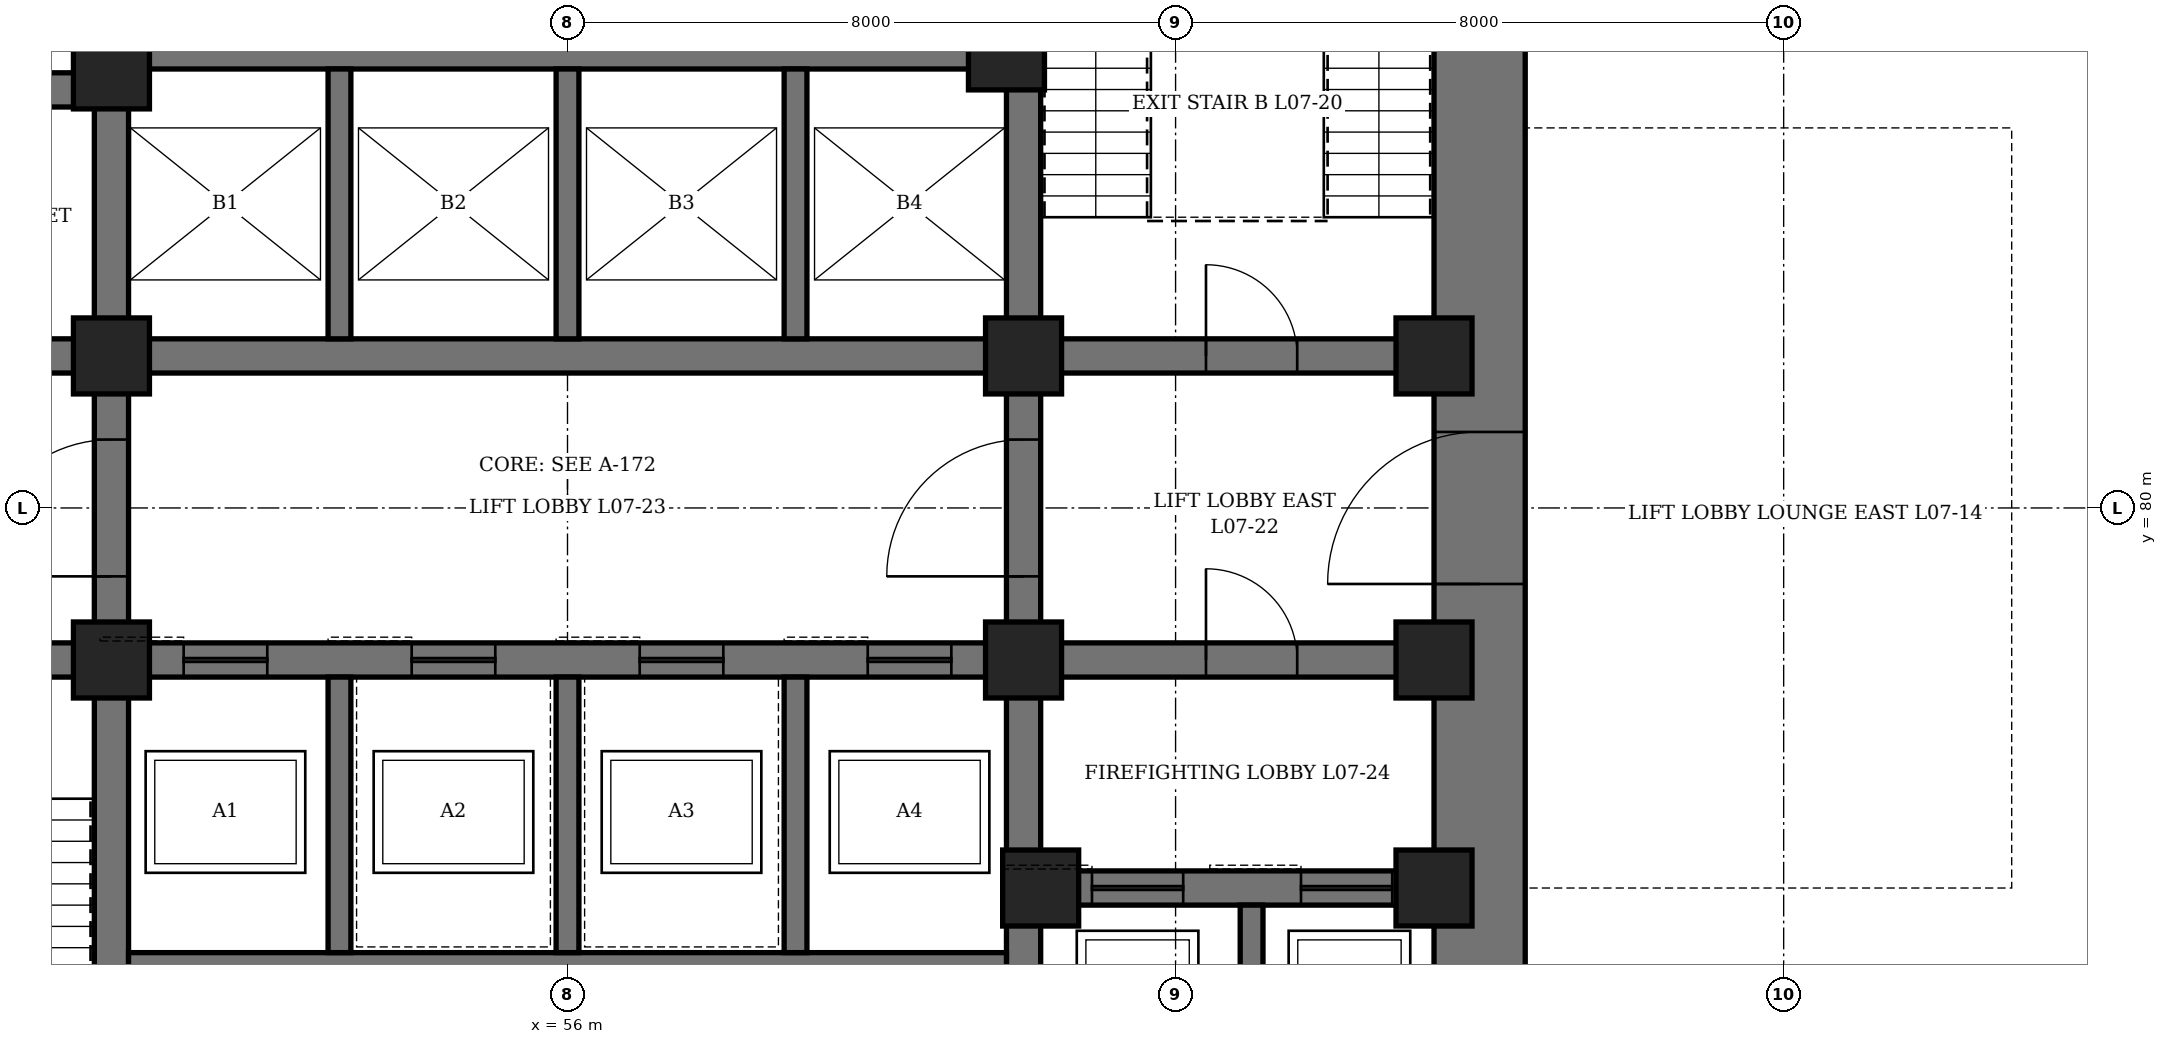
"""IFC4 building model, lengths in metres.
Left out: names, types, materials, properties, quantities, classifications, styles, units other than length and angle.
Written with IfcOpenShell. Run it as: python <this file> out.ifc"""

import sys

from ifc_helpers import new_model, si_unit, direction, frame, frame_2d, origin, origin_2d, place, context, subcontext, project, spatial, rectangle, hollow_rectangle, extrude, element, fill, save


model = new_model("IFC4")
c1 = context("Model", 3, precision=1e-05, world=origin(), true_north=direction((0.0, 1.0)))
c2 = subcontext(c1, "Body", "Model", "MODEL_VIEW")
j1 = project(units=[si_unit("LENGTHUNIT", "METRE"), si_unit("PLANEANGLEUNIT", "RADIAN")], contexts=[c1])
p1 = place(None, origin())
s1 = spatial("IfcSite", under=j1, at=p1, CompositionType="ELEMENT")
p2 = place(p1, origin())
s2 = spatial("IfcBuilding", under=s1, at=p2, CompositionType="ELEMENT")
p3 = place(p2, frame((0.0, 0.0, 39.1)))
s3 = spatial("IfcBuildingStorey", under=s2, at=p3, CompositionType="ELEMENT", Elevation=39.1)
p4 = place(p3, frame((68.0, 70.4, 0.0), z_axis=(0.0, 0.0, 1.0), x_axis=(0.0, 1.0, 0.0)))
e1 = element("IfcWall", 1, at=p4, inside=s3, PredefinedType="SHEAR", context=c2, shape_type="SweptSolid", body=[
    extrude(rectangle(XDim=19.2, YDim=1.2, at=frame_2d((9.6, 0.0))), origin(), (0.0, 0.0, 1.0), 4.2),
])
p5 = place(p4, frame((8.6, 0.0, 0.0)))
e2 = element("IfcOpeningElement", 2, at=p5, cuts=e1, PredefinedType="OPENING", context=c2, shape_type="SweptSolid", body=[
    extrude(rectangle(XDim=2.0, YDim=2.4, at=frame_2d((1.0, 1.2))), frame((0.0, 0.61, 0.0), z_axis=(0.0, -1.0, 0.0), x_axis=(1.0, 0.0, 0.0)), (0.0, 0.0, 1.0), 1.22),
])
p6 = place(p3, frame((50.0, 71.6, 0.0), z_axis=(0.0, 0.0, 1.0), x_axis=(0.0, 1.0, 0.0)))
e3 = element("IfcWall", 3, at=p6, inside=s3, PredefinedType="SHEAR", context=c2, shape_type="SweptSolid", body=[
    extrude(rectangle(XDim=16.8, YDim=0.45, at=frame_2d((8.4, 0.0))), origin(), (0.0, 0.0, 1.0), 4.2),
])
p7 = place(p6, frame((7.5, 0.0, 0.0)))
e4 = element("IfcOpeningElement", 4, at=p7, cuts=e3, PredefinedType="OPENING", context=c2, shape_type="SweptSolid", body=[
    extrude(rectangle(XDim=1.8, YDim=2.4, at=frame_2d((0.9, 1.2))), frame((0.0, 0.235, 0.0), z_axis=(0.0, -1.0, 0.0), x_axis=(1.0, 0.0, 0.0)), (0.0, 0.0, 1.0), 0.47),
])
p8 = place(p3, frame((62.0, 71.6, 0.0), z_axis=(0.0, 0.0, 1.0), x_axis=(0.0, 1.0, 0.0)))
e5 = element("IfcWall", 5, at=p8, inside=s3, PredefinedType="SHEAR", context=c2, shape_type="SweptSolid", body=[
    extrude(rectangle(XDim=16.8, YDim=0.45, at=frame_2d((8.4, 0.0))), origin(), (0.0, 0.0, 1.0), 4.2),
])
p9 = place(p8, frame((7.5, 0.0, 0.0)))
e6 = element("IfcOpeningElement", 6, at=p9, cuts=e5, PredefinedType="OPENING", context=c2, shape_type="SweptSolid", body=[
    extrude(rectangle(XDim=1.8, YDim=2.4, at=frame_2d((0.9, 1.2))), frame((0.0, 0.235, 0.0), z_axis=(0.0, -1.0, 0.0), x_axis=(1.0, 0.0, 0.0)), (0.0, 0.0, 1.0), 0.47),
])
p10 = place(p3, frame((44.6, 78.0, 0.0), z_axis=(0.0, 0.0, 1.0), x_axis=(1.0, 0.0, 0.0)))
e7 = element("IfcWall", 7, at=p10, inside=s3, PredefinedType="SHEAR", context=c2, shape_type="SweptSolid", body=[
    extrude(rectangle(XDim=5.175, YDim=0.45, at=frame_2d((2.587, 0.0))), origin(), (0.0, 0.0, 1.0), 4.2),
])
p11 = place(p10, frame((1.8, 0.0, 0.0)))
e8 = element("IfcOpeningElement", 8, at=p11, cuts=e7, PredefinedType="OPENING", context=c2, shape_type="SweptSolid", body=[
    extrude(rectangle(XDim=1.2, YDim=2.1, at=frame_2d((0.6, 1.05))), frame((0.0, 0.235, 0.0), z_axis=(0.0, -1.0, 0.0), x_axis=(1.0, 0.0, 0.0)), (0.0, 0.0, 1.0), 0.47),
])
p12 = place(p3, frame((44.6, 82.0, 0.0), z_axis=(0.0, 0.0, 1.0), x_axis=(1.0, 0.0, 0.0)))
e9 = element("IfcWall", 9, at=p12, inside=s3, PredefinedType="SHEAR", context=c2, shape_type="SweptSolid", body=[
    extrude(rectangle(XDim=5.175, YDim=0.45, at=frame_2d((2.587, 0.0))), origin(), (0.0, 0.0, 1.0), 4.2),
])
p13 = place(p12, frame((0.7, 0.0, 0.0)))
e10 = element("IfcOpeningElement", 10, at=p13, cuts=e9, PredefinedType="OPENING", context=c2, shape_type="SweptSolid", body=[
    extrude(rectangle(XDim=0.9, YDim=2.1, at=frame_2d((0.45, 1.05))), frame((0.0, 0.235, 0.0), z_axis=(0.0, -1.0, 0.0), x_axis=(1.0, 0.0, 0.0)), (0.0, 0.0, 1.0), 0.47),
])
p14 = place(p3, frame((44.6, 85.5, 0.0), z_axis=(0.0, 0.0, 1.0), x_axis=(1.0, 0.0, 0.0)))
e11 = element("IfcWall", 11, at=p14, inside=s3, PredefinedType="SHEAR", context=c2, shape_type="SweptSolid", body=[
    extrude(rectangle(XDim=5.175, YDim=0.45, at=frame_2d((2.587, 0.0))), origin(), (0.0, 0.0, 1.0), 4.2),
])
p15 = place(p14, frame((0.7, 0.0, 0.0)))
e12 = element("IfcOpeningElement", 12, at=p15, cuts=e11, PredefinedType="OPENING", context=c2, shape_type="SweptSolid", body=[
    extrude(rectangle(XDim=0.9, YDim=2.1, at=frame_2d((0.45, 1.05))), frame((0.0, 0.235, 0.0), z_axis=(0.0, -1.0, 0.0), x_axis=(1.0, 0.0, 0.0)), (0.0, 0.0, 1.0), 0.47),
])
p16 = place(p3, frame((62.225, 75.0, 0.0), z_axis=(0.0, 0.0, 1.0), x_axis=(1.0, 0.0, 0.0)))
e13 = element("IfcWall", 13, at=p16, inside=s3, PredefinedType="SHEAR", context=c2, shape_type="SweptSolid", body=[
    extrude(rectangle(XDim=5.175, YDim=0.45, at=frame_2d((2.587, 0.0))), origin(), (0.0, 0.0, 1.0), 4.2),
])
p17 = place(p16, frame((0.675, 0.0, 0.0)))
e14 = element("IfcOpeningElement", 14, at=p17, cuts=e13, PredefinedType="OPENING", context=c2, shape_type="SweptSolid", body=[
    extrude(rectangle(XDim=1.2, YDim=2.2, at=frame_2d((0.6, 1.1))), frame((0.0, 0.235, 0.0), z_axis=(0.0, -1.0, 0.0), x_axis=(1.0, 0.0, 0.0)), (0.0, 0.0, 1.0), 0.47),
])
p18 = place(p16, frame((3.425, 0.0, 0.0)))
e15 = element("IfcOpeningElement", 15, at=p18, cuts=e13, PredefinedType="OPENING", context=c2, shape_type="SweptSolid", body=[
    extrude(rectangle(XDim=1.2, YDim=2.2, at=frame_2d((0.6, 1.1))), frame((0.0, 0.235, 0.0), z_axis=(0.0, -1.0, 0.0), x_axis=(1.0, 0.0, 0.0)), (0.0, 0.0, 1.0), 0.47),
])
p19 = place(p3, frame((62.225, 78.0, 0.0), z_axis=(0.0, 0.0, 1.0), x_axis=(1.0, 0.0, 0.0)))
e16 = element("IfcWall", 16, at=p19, inside=s3, PredefinedType="SHEAR", context=c2, shape_type="SweptSolid", body=[
    extrude(rectangle(XDim=5.175, YDim=0.45, at=frame_2d((2.587, 0.0))), origin(), (0.0, 0.0, 1.0), 4.2),
])
p20 = place(p19, frame((2.175, 0.0, 0.0)))
e17 = element("IfcOpeningElement", 17, at=p20, cuts=e16, PredefinedType="OPENING", context=c2, shape_type="SweptSolid", body=[
    extrude(rectangle(XDim=1.2, YDim=2.1, at=frame_2d((0.6, 1.05))), frame((0.0, 0.235, 0.0), z_axis=(0.0, -1.0, 0.0), x_axis=(1.0, 0.0, 0.0)), (0.0, 0.0, 1.0), 0.47),
])
p21 = place(p3, frame((62.225, 82.0, 0.0), z_axis=(0.0, 0.0, 1.0), x_axis=(1.0, 0.0, 0.0)))
e18 = element("IfcWall", 18, at=p21, inside=s3, PredefinedType="SHEAR", context=c2, shape_type="SweptSolid", body=[
    extrude(rectangle(XDim=5.175, YDim=0.45, at=frame_2d((2.587, 0.0))), origin(), (0.0, 0.0, 1.0), 4.2),
])
p22 = place(p21, frame((2.175, 0.0, 0.0)))
e19 = element("IfcOpeningElement", 19, at=p22, cuts=e18, PredefinedType="OPENING", context=c2, shape_type="SweptSolid", body=[
    extrude(rectangle(XDim=1.2, YDim=2.1, at=frame_2d((0.6, 1.05))), frame((0.0, 0.235, 0.0), z_axis=(0.0, -1.0, 0.0), x_axis=(1.0, 0.0, 0.0)), (0.0, 0.0, 1.0), 0.47),
])
p23 = place(p3, frame((50.225, 78.0, 0.0), z_axis=(0.0, 0.0, 1.0), x_axis=(1.0, 0.0, 0.0)))
e20 = element("IfcWall", 20, at=p23, inside=s3, PredefinedType="SHEAR", context=c2, shape_type="SweptSolid", body=[
    extrude(rectangle(XDim=11.55, YDim=0.45, at=frame_2d((5.775, 0.0))), origin(), (0.0, 0.0, 1.0), 4.2),
])
p24 = place(p23, frame((0.725, 0.0, 0.0)))
e21 = element("IfcOpeningElement", 21, at=p24, cuts=e20, PredefinedType="OPENING", context=c2, shape_type="SweptSolid", body=[
    extrude(rectangle(XDim=1.1, YDim=2.2, at=frame_2d((0.55, 1.1))), frame((0.0, 0.235, 0.0), z_axis=(0.0, -1.0, 0.0), x_axis=(1.0, 0.0, 0.0)), (0.0, 0.0, 1.0), 0.47),
])
p25 = place(p23, frame((3.725, 0.0, 0.0)))
e22 = element("IfcOpeningElement", 22, at=p25, cuts=e20, PredefinedType="OPENING", context=c2, shape_type="SweptSolid", body=[
    extrude(rectangle(XDim=1.1, YDim=2.2, at=frame_2d((0.55, 1.1))), frame((0.0, 0.235, 0.0), z_axis=(0.0, -1.0, 0.0), x_axis=(1.0, 0.0, 0.0)), (0.0, 0.0, 1.0), 0.47),
])
p26 = place(p23, frame((6.725, 0.0, 0.0)))
e23 = element("IfcOpeningElement", 23, at=p26, cuts=e20, PredefinedType="OPENING", context=c2, shape_type="SweptSolid", body=[
    extrude(rectangle(XDim=1.1, YDim=2.2, at=frame_2d((0.55, 1.1))), frame((0.0, 0.235, 0.0), z_axis=(0.0, -1.0, 0.0), x_axis=(1.0, 0.0, 0.0)), (0.0, 0.0, 1.0), 0.47),
])
p27 = place(p23, frame((9.725, 0.0, 0.0)))
e24 = element("IfcOpeningElement", 24, at=p27, cuts=e20, PredefinedType="OPENING", context=c2, shape_type="SweptSolid", body=[
    extrude(rectangle(XDim=1.1, YDim=2.2, at=frame_2d((0.55, 1.1))), frame((0.0, 0.235, 0.0), z_axis=(0.0, -1.0, 0.0), x_axis=(1.0, 0.0, 0.0)), (0.0, 0.0, 1.0), 0.47),
])
for number, where, z_axis, x_axis in (
    (25, (50.225, 82.0, 0.0), (0.0, 0.0, 1.0), (1.0, 0.0, 0.0)),
    (26, (50.225, 86.0, 0.0), (0.0, 0.0, 1.0), (1.0, 0.0, 0.0)),
):
    element("IfcWall", number, at=place(p3, frame(where, z_axis=z_axis, x_axis=x_axis)), inside=s3, PredefinedType="SHEAR", context=c2, shape_type="SweptSolid", body=[
        extrude(rectangle(XDim=11.55, YDim=0.45, at=frame_2d((5.775, 0.0))), origin(), (0.0, 0.0, 1.0), 4.2),
    ])
p28 = place(p3, frame((50.225, 74.0, 0.0), z_axis=(0.0, 0.0, 1.0), x_axis=(1.0, 0.0, 0.0)))
e27 = element("IfcWall", 27, at=p28, inside=s3, PredefinedType="SHEAR", context=c2, shape_type="SweptSolid", body=[
    extrude(rectangle(XDim=11.55, YDim=0.3, at=frame_2d((5.775, 0.0))), origin(), (0.0, 0.0, 1.0), 4.2),
])
p29 = place(p3, frame((53.0, 74.15, 0.0), z_axis=(0.0, 0.0, 1.0), x_axis=(0.0, 1.0, 0.0)))
e28 = element("IfcWall", 28, at=p29, inside=s3, PredefinedType="SHEAR", context=c2, shape_type="SweptSolid", body=[
    extrude(rectangle(XDim=3.625, YDim=0.3, at=frame_2d((1.812, 0.0))), origin(), (0.0, 0.0, 1.0), 4.2),
])
p30 = place(p3, frame((53.0, 82.225, 0.0), z_axis=(0.0, 0.0, 1.0), x_axis=(0.0, 1.0, 0.0)))
e29 = element("IfcWall", 29, at=p30, inside=s3, PredefinedType="SHEAR", context=c2, shape_type="SweptSolid", body=[
    extrude(rectangle(XDim=3.55, YDim=0.3, at=frame_2d((1.775, 0.0))), origin(), (0.0, 0.0, 1.0), 4.2),
])
p31 = place(p3, frame((56.0, 74.15, 0.0), z_axis=(0.0, 0.0, 1.0), x_axis=(0.0, 1.0, 0.0)))
e30 = element("IfcWall", 30, at=p31, inside=s3, PredefinedType="SHEAR", context=c2, shape_type="SweptSolid", body=[
    extrude(rectangle(XDim=3.625, YDim=0.3, at=frame_2d((1.812, 0.0))), origin(), (0.0, 0.0, 1.0), 4.2),
])
p32 = place(p3, frame((56.0, 82.225, 0.0), z_axis=(0.0, 0.0, 1.0), x_axis=(0.0, 1.0, 0.0)))
e31 = element("IfcWall", 31, at=p32, inside=s3, PredefinedType="SHEAR", context=c2, shape_type="SweptSolid", body=[
    extrude(rectangle(XDim=3.55, YDim=0.3, at=frame_2d((1.775, 0.0))), origin(), (0.0, 0.0, 1.0), 4.2),
])
p33 = place(p3, frame((59.0, 74.15, 0.0), z_axis=(0.0, 0.0, 1.0), x_axis=(0.0, 1.0, 0.0)))
e32 = element("IfcWall", 32, at=p33, inside=s3, PredefinedType="SHEAR", context=c2, shape_type="SweptSolid", body=[
    extrude(rectangle(XDim=3.625, YDim=0.3, at=frame_2d((1.812, 0.0))), origin(), (0.0, 0.0, 1.0), 4.2),
])
p34 = place(p3, frame((59.0, 82.225, 0.0), z_axis=(0.0, 0.0, 1.0), x_axis=(0.0, 1.0, 0.0)))
e33 = element("IfcWall", 33, at=p34, inside=s3, PredefinedType="SHEAR", context=c2, shape_type="SweptSolid", body=[
    extrude(rectangle(XDim=3.55, YDim=0.3, at=frame_2d((1.775, 0.0))), origin(), (0.0, 0.0, 1.0), 4.2),
])
p35 = place(p3, frame((65.0, 71.6, 0.0), z_axis=(0.0, 0.0, 1.0), x_axis=(0.0, 1.0, 0.0)))
e34 = element("IfcWall", 34, at=p35, inside=s3, PredefinedType="SHEAR", context=c2, shape_type="SweptSolid", body=[
    extrude(rectangle(XDim=3.175, YDim=0.3, at=frame_2d((1.587, 0.0))), origin(), (0.0, 0.0, 1.0), 4.2),
])
for number, where, z_axis, x_axis in (
    (35, (50.0, 78.0, 0.0), (0.0, 0.0, 1.0), (1.0, 0.0, 0.0)),
    (36, (50.0, 82.0, 0.0), (0.0, 0.0, 1.0), (1.0, 0.0, 0.0)),
    (37, (50.0, 85.75, 0.0), (0.0, 0.0, 1.0), (1.0, 0.0, 0.0)),
    (38, (61.775, 86.0, 0.0), (0.0, 0.0, 1.0), (1.0, 0.0, 0.0)),
    (39, (62.0, 78.0, 0.0), (0.0, 0.0, 1.0), (1.0, 0.0, 0.0)),
    (40, (62.0, 82.0, 0.0), (0.0, 0.0, 1.0), (1.0, 0.0, 0.0)),
    (41, (62.225, 75.0, 0.0), (0.0, 0.0, 1.0), (1.0, 0.0, 0.0)),
    (42, (67.4, 75.0, 0.0), (0.0, 0.0, 1.0), (1.0, 0.0, 0.0)),
    (43, (67.4, 78.0, 0.0), (0.0, 0.0, 1.0), (1.0, 0.0, 0.0)),
    (44, (67.4, 82.0, 0.0), (0.0, 0.0, 1.0), (1.0, 0.0, 0.0)),
):
    element("IfcColumn", number, at=place(p3, frame(where, z_axis=z_axis, x_axis=x_axis)), inside=s3, PredefinedType="COLUMN", context=c2, shape_type="SweptSolid", body=[
        extrude(hollow_rectangle(XDim=1.0, YDim=1.0, WallThickness=0.15, at=origin_2d()), origin(), (0.0, 0.0, 1.0), 4.2),
    ])
p36 = place(p22, origin())
e45 = element("IfcDoor", 45, at=p36, inside=s3, OperationType="SINGLE_SWING_LEFT", PredefinedType="DOOR", context=c2, shape_type="SweptSolid", body=[
    extrude(rectangle(XDim=1.2, YDim=2.1, at=frame_2d((0.6, 1.05))), frame((0.0, 0.225, 0.0), z_axis=(0.0, -1.0, 0.0), x_axis=(1.0, 0.0, 0.0)), (0.0, 0.0, 1.0), 0.449),
])
fill(e19, e45)
p37 = place(p5, origin())
e46 = element("IfcDoor", 46, at=p37, inside=s3, OperationType="DOUBLE_DOOR_SINGLE_SWING", PredefinedType="DOOR", context=c2, shape_type="SweptSolid", body=[
    extrude(rectangle(XDim=2.0, YDim=2.4, at=frame_2d((1.0, 1.2))), frame((0.0, 0.35, 0.0), z_axis=(0.0, -1.0, 0.0), x_axis=(1.0, 0.0, 0.0)), (0.0, 0.0, 1.0), 0.7),
])
fill(e2, e46)
p38 = place(p7, origin())
e47 = element("IfcDoor", 47, at=p38, inside=s3, OperationType="DOUBLE_DOOR_SINGLE_SWING", PredefinedType="DOOR", context=c2, shape_type="SweptSolid", body=[
    extrude(rectangle(XDim=1.8, YDim=2.4, at=frame_2d((0.9, 1.2))), frame((0.0, 0.225, 0.0), z_axis=(0.0, -1.0, 0.0), x_axis=(1.0, 0.0, 0.0)), (0.0, 0.0, 1.0), 0.449),
])
fill(e4, e47)
p39 = place(p9, origin())
e48 = element("IfcDoor", 48, at=p39, inside=s3, OperationType="DOUBLE_DOOR_SINGLE_SWING", PredefinedType="DOOR", context=c2, shape_type="SweptSolid", body=[
    extrude(rectangle(XDim=1.8, YDim=2.4, at=frame_2d((0.9, 1.2))), frame((0.0, 0.225, 0.0), z_axis=(0.0, -1.0, 0.0), x_axis=(1.0, 0.0, 0.0)), (0.0, 0.0, 1.0), 0.449),
])
fill(e6, e48)
p40 = place(p20, origin())
e49 = element("IfcDoor", 49, at=p40, inside=s3, OperationType="SINGLE_SWING_RIGHT", PredefinedType="DOOR", context=c2, shape_type="SweptSolid", body=[
    extrude(rectangle(XDim=1.2, YDim=2.1, at=frame_2d((0.6, 1.05))), frame((0.0, 0.225, 0.0), z_axis=(0.0, -1.0, 0.0), x_axis=(1.0, 0.0, 0.0)), (0.0, 0.0, 1.0), 0.449),
])
fill(e17, e49)
p41 = place(p24, origin())
e50 = element("IfcDoor", 50, at=p41, inside=s3, OperationType="SLIDING_TO_LEFT", PredefinedType="DOOR", context=c2, shape_type="SweptSolid", body=[
    extrude(rectangle(XDim=1.1, YDim=2.2, at=frame_2d((0.55, 1.1))), frame((0.0, 0.225, 0.0), z_axis=(0.0, -1.0, 0.0), x_axis=(1.0, 0.0, 0.0)), (0.0, 0.0, 1.0), 0.449),
])
fill(e21, e50)
p42 = place(p25, origin())
e51 = element("IfcDoor", 51, at=p42, inside=s3, OperationType="SLIDING_TO_LEFT", PredefinedType="DOOR", context=c2, shape_type="SweptSolid", body=[
    extrude(rectangle(XDim=1.1, YDim=2.2, at=frame_2d((0.55, 1.1))), frame((0.0, 0.225, 0.0), z_axis=(0.0, -1.0, 0.0), x_axis=(1.0, 0.0, 0.0)), (0.0, 0.0, 1.0), 0.449),
])
fill(e22, e51)
p43 = place(p26, origin())
e52 = element("IfcDoor", 52, at=p43, inside=s3, OperationType="SLIDING_TO_LEFT", PredefinedType="DOOR", context=c2, shape_type="SweptSolid", body=[
    extrude(rectangle(XDim=1.1, YDim=2.2, at=frame_2d((0.55, 1.1))), frame((0.0, 0.225, 0.0), z_axis=(0.0, -1.0, 0.0), x_axis=(1.0, 0.0, 0.0)), (0.0, 0.0, 1.0), 0.449),
])
fill(e23, e52)
p44 = place(p27, origin())
e53 = element("IfcDoor", 53, at=p44, inside=s3, OperationType="SLIDING_TO_LEFT", PredefinedType="DOOR", context=c2, shape_type="SweptSolid", body=[
    extrude(rectangle(XDim=1.1, YDim=2.2, at=frame_2d((0.55, 1.1))), frame((0.0, 0.225, 0.0), z_axis=(0.0, -1.0, 0.0), x_axis=(1.0, 0.0, 0.0)), (0.0, 0.0, 1.0), 0.449),
])
fill(e24, e53)
p45 = place(p17, origin())
e54 = element("IfcDoor", 54, at=p45, inside=s3, OperationType="SLIDING_TO_LEFT", PredefinedType="DOOR", context=c2, shape_type="SweptSolid", body=[
    extrude(rectangle(XDim=1.2, YDim=2.2, at=frame_2d((0.6, 1.1))), frame((0.0, 0.225, 0.0), z_axis=(0.0, -1.0, 0.0), x_axis=(1.0, 0.0, 0.0)), (0.0, 0.0, 1.0), 0.449),
])
fill(e14, e54)
p46 = place(p18, origin())
e55 = element("IfcDoor", 55, at=p46, inside=s3, OperationType="SLIDING_TO_LEFT", PredefinedType="DOOR", context=c2, shape_type="SweptSolid", body=[
    extrude(rectangle(XDim=1.2, YDim=2.2, at=frame_2d((0.6, 1.1))), frame((0.0, 0.225, 0.0), z_axis=(0.0, -1.0, 0.0), x_axis=(1.0, 0.0, 0.0)), (0.0, 0.0, 1.0), 0.449),
])
fill(e15, e55)
save(model, sys.argv[1])
